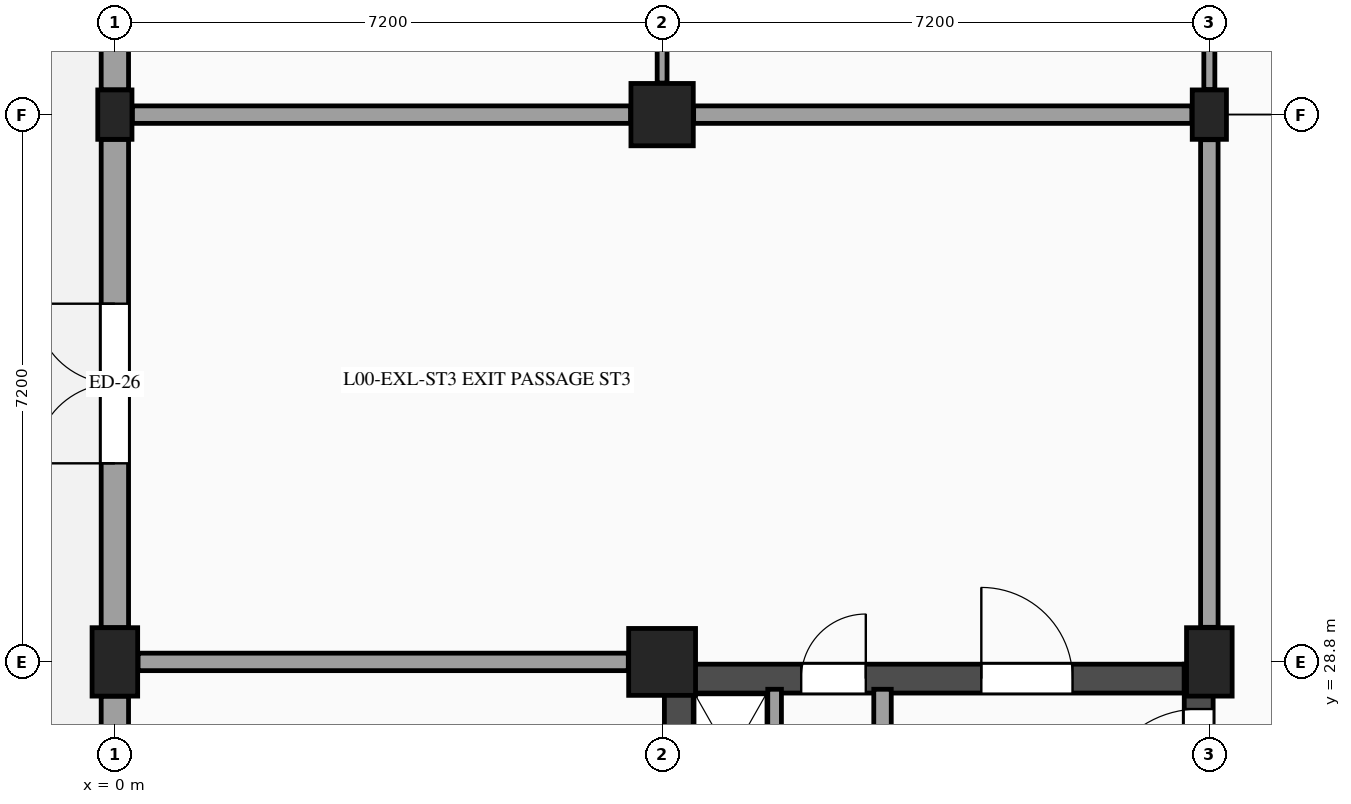
"""IFC4 building model, lengths in metres.
Left out: names, types, materials, properties, quantities, classifications, styles, units other than length and angle.
Written with IfcOpenShell. Run it as: python <this file> out.ifc"""

import sys

from ifc_helpers import new_model, si_unit, direction, frame, frame_2d, origin, origin_2d, place, context, subcontext, project, spatial, rectangle, extrude, element, fill, save


model = new_model("IFC4")
c1 = context("Model", 3, precision=1e-05, world=origin(), true_north=direction((0.0, 1.0)))
c2 = subcontext(c1, "Body", "Model", "MODEL_VIEW")
j1 = project(units=[si_unit("LENGTHUNIT", "METRE"), si_unit("PLANEANGLEUNIT", "RADIAN")], contexts=[c1])
p1 = place(None, origin())
s1 = spatial("IfcSite", under=j1, at=p1, CompositionType="ELEMENT")
p2 = place(p1, origin())
s2 = spatial("IfcBuilding", under=s1, at=p2, CompositionType="ELEMENT")
p3 = place(p2, origin())
s3 = spatial("IfcBuildingStorey", under=s2, at=p3, CompositionType="ELEMENT", Elevation=0.0)
p4 = place(p3, frame((0.0, 28.8, 0.0), z_axis=(0.0, 0.0, 1.0), x_axis=(1.0, 0.0, 0.0)))
e1 = element("IfcColumn", 1, at=p4, inside=s3, PredefinedType="COLUMN", context=c2, shape_type="SweptSolid", body=[
    extrude(rectangle(XDim=0.6, YDim=0.9, at=origin_2d()), origin(), (0.0, 0.0, 1.0), 5.4),
])
p5 = place(p3, frame((0.0, 36.0, 0.0), z_axis=(0.0, 0.0, 1.0), x_axis=(1.0, 0.0, 0.0)))
e2 = element("IfcColumn", 2, at=p5, inside=s3, PredefinedType="PILASTER", context=c2, shape_type="SweptSolid", body=[
    extrude(rectangle(XDim=0.45, YDim=0.65, at=origin_2d()), origin(), (0.0, 0.0, 1.0), 5.4),
])
p6 = place(p3, frame((7.2, 28.8, 0.0), z_axis=(0.0, 0.0, 1.0), x_axis=(1.0, 0.0, 0.0)))
e3 = element("IfcColumn", 3, at=p6, inside=s3, PredefinedType="COLUMN", context=c2, shape_type="SweptSolid", body=[
    extrude(rectangle(XDim=0.88, YDim=0.88, at=origin_2d()), origin(), (0.0, 0.0, 1.0), 5.4),
])
p7 = place(p3, frame((7.2, 36.0, 0.0), z_axis=(0.0, 0.0, 1.0), x_axis=(1.0, 0.0, 0.0)))
e4 = element("IfcColumn", 4, at=p7, inside=s3, PredefinedType="COLUMN", context=c2, shape_type="SweptSolid", body=[
    extrude(rectangle(XDim=0.82, YDim=0.82, at=origin_2d()), origin(), (0.0, 0.0, 1.0), 5.4),
])
p8 = place(p3, frame((14.4, 28.8, 0.0), z_axis=(0.0, 0.0, 1.0), x_axis=(1.0, 0.0, 0.0)))
e5 = element("IfcColumn", 5, at=p8, inside=s3, PredefinedType="COLUMN", context=c2, shape_type="SweptSolid", body=[
    extrude(rectangle(XDim=0.6, YDim=0.9, at=origin_2d()), origin(), (0.0, 0.0, 1.0), 5.4),
])
p9 = place(p3, frame((14.4, 36.0, 0.0), z_axis=(0.0, 0.0, 1.0), x_axis=(1.0, 0.0, 0.0)))
e6 = element("IfcColumn", 6, at=p9, inside=s3, PredefinedType="PILASTER", context=c2, shape_type="SweptSolid", body=[
    extrude(rectangle(XDim=0.45, YDim=0.65, at=origin_2d()), origin(), (0.0, 0.0, 1.0), 5.4),
])
p10 = place(p3, frame((0.0, 22.0, 0.0), z_axis=(0.0, 0.0, 1.0), x_axis=(0.0, 1.0, 0.0)))
e7 = element("IfcWall", 7, at=p10, inside=s3, PredefinedType="STANDARD", context=c2, shape_type="SweptSolid", body=[
    extrude(rectangle(XDim=6.35, YDim=0.36, at=frame_2d((3.175, 0.0))), origin(), (0.0, 0.0, 1.0), 4.335),
])
p11 = place(p10, frame((2.125, 0.0, 0.0)))
e8 = element("IfcOpeningElement", 8, at=p11, cuts=e7, PredefinedType="OPENING", context=c2, shape_type="SweptSolid", body=[
    extrude(rectangle(XDim=2.1, YDim=2.4, at=frame_2d((1.05, 1.2))), frame((0.0, 0.19, 0.0), z_axis=(0.0, -1.0, 0.0), x_axis=(1.0, 0.0, 0.0)), (0.0, 0.0, 1.0), 0.38),
])
p12 = place(p3, frame((0.0, 29.25, 0.0), z_axis=(0.0, 0.0, 1.0), x_axis=(0.0, 1.0, 0.0)))
e9 = element("IfcWall", 9, at=p12, inside=s3, PredefinedType="STANDARD", context=c2, shape_type="SweptSolid", body=[
    extrude(rectangle(XDim=6.425, YDim=0.36, at=frame_2d((3.212, 0.0))), origin(), (0.0, 0.0, 1.0), 4.335),
])
p13 = place(p12, frame((2.163, 0.0, 0.0)))
e10 = element("IfcOpeningElement", 10, at=p13, cuts=e9, PredefinedType="OPENING", context=c2, shape_type="SweptSolid", body=[
    extrude(rectangle(XDim=2.1, YDim=2.4, at=frame_2d((1.05, 1.2))), frame((0.0, 0.19, 0.0), z_axis=(0.0, -1.0, 0.0), x_axis=(1.0, 0.0, 0.0)), (0.0, 0.0, 1.0), 0.38),
])
p14 = place(p3, frame((0.0, 36.325, 0.0), z_axis=(0.0, 0.0, 1.0), x_axis=(0.0, 1.0, 0.0)))
e11 = element("IfcWall", 11, at=p14, inside=s3, PredefinedType="STANDARD", context=c2, shape_type="SweptSolid", body=[
    extrude(rectangle(XDim=6.425, YDim=0.36, at=frame_2d((3.212, 0.0))), origin(), (0.0, 0.0, 1.0), 4.335),
])
p15 = place(p14, frame((2.163, 0.0, 0.0)))
e12 = element("IfcOpeningElement", 12, at=p15, cuts=e11, PredefinedType="OPENING", context=c2, shape_type="SweptSolid", body=[
    extrude(rectangle(XDim=2.1, YDim=2.4, at=frame_2d((1.05, 1.2))), frame((0.0, 0.19, 0.0), z_axis=(0.0, -1.0, 0.0), x_axis=(1.0, 0.0, 0.0)), (0.0, 0.0, 1.0), 0.38),
])
p16 = place(p3, frame((7.42, 28.77, 0.0), z_axis=(0.0, 0.0, 1.0), x_axis=(0.0, -1.0, 0.0)))
e13 = element("IfcWall", 13, at=p16, inside=s3, PredefinedType="SHEAR", context=c2, shape_type="SweptSolid", body=[
    extrude(rectangle(XDim=7.14, YDim=0.38, at=frame_2d((3.57, 0.0))), origin(), (0.0, 0.0, 1.0), 5.09),
])
p17 = place(p3, frame((7.61, 28.58, 0.0), z_axis=(0.0, 0.0, 1.0), x_axis=(1.0, 0.0, 0.0)))
e14 = element("IfcWall", 14, at=p17, inside=s3, PredefinedType="SHEAR", context=c2, shape_type="SweptSolid", body=[
    extrude(rectangle(XDim=6.46, YDim=0.38, at=frame_2d((3.23, 0.0))), origin(), (0.0, 0.0, 1.0), 5.09),
])
p18 = place(p17, frame((1.42, 0.0, 0.0)))
e15 = element("IfcOpeningElement", 15, at=p18, cuts=e14, PredefinedType="OPENING", context=c2, shape_type="SweptSolid", body=[
    extrude(rectangle(XDim=0.85, YDim=2.1, at=frame_2d((0.425, 1.05))), frame((0.0, 0.2, 0.0), z_axis=(0.0, -1.0, 0.0), x_axis=(1.0, 0.0, 0.0)), (0.0, 0.0, 1.0), 0.4),
])
p19 = place(p17, frame((3.79, 0.0, 0.0)))
e16 = element("IfcOpeningElement", 16, at=p19, cuts=e14, PredefinedType="OPENING", context=c2, shape_type="SweptSolid", body=[
    extrude(rectangle(XDim=1.2, YDim=2.2, at=frame_2d((0.6, 1.1))), frame((0.0, 0.2, 0.0), z_axis=(0.0, -1.0, 0.0), x_axis=(1.0, 0.0, 0.0)), (0.0, 0.0, 1.0), 0.4),
])
p20 = place(p3, frame((10.1, 26.7, 0.0), z_axis=(0.0, 0.0, 1.0), x_axis=(0.0, 1.0, 0.0)))
e17 = element("IfcWall", 17, at=p20, inside=s3, PredefinedType="PARTITIONING", context=c2, shape_type="SweptSolid", body=[
    extrude(rectangle(XDim=1.74, YDim=0.23, at=frame_2d((0.87, 0.0))), origin(), (0.0, 0.0, 1.0), 5.09),
])
p21 = place(p3, frame((8.68, 26.68, 0.0), z_axis=(0.0, 0.0, 1.0), x_axis=(0.0, 1.0, 0.0)))
e18 = element("IfcWall", 18, at=p21, inside=s3, PredefinedType="PARTITIONING", context=c2, shape_type="SweptSolid", body=[
    extrude(rectangle(XDim=1.76, YDim=0.18, at=frame_2d((0.88, 0.0))), origin(), (0.0, 0.0, 1.0), 5.09),
])
p22 = place(p3, frame((14.26, 21.63, 0.0), z_axis=(0.0, 0.0, 1.0), x_axis=(0.0, 1.0, 0.0)))
e19 = element("IfcWall", 19, at=p22, inside=s3, PredefinedType="SHEAR", context=c2, shape_type="SweptSolid", body=[
    extrude(rectangle(XDim=7.14, YDim=0.38, at=frame_2d((3.57, 0.0))), origin(), (0.0, 0.0, 1.0), 5.09),
])
p23 = place(p22, frame((5.2, 0.0, 0.0)))
e20 = element("IfcOpeningElement", 20, at=p23, cuts=e19, PredefinedType="OPENING", context=c2, shape_type="SweptSolid", body=[
    extrude(rectangle(XDim=1.35, YDim=2.15, at=frame_2d((0.675, 1.075))), frame((0.0, 0.2, 0.0), z_axis=(0.0, -1.0, 0.0), x_axis=(1.0, 0.0, 0.0)), (0.0, 0.0, 1.0), 0.4),
])
p24 = place(p3, frame((0.305, 28.8, 0.0), z_axis=(0.0, 0.0, 1.0), x_axis=(1.0, 0.0, 0.0)))
e21 = element("IfcWall", 21, at=p24, inside=s3, PredefinedType="PARTITIONING", context=c2, shape_type="SweptSolid", body=[
    extrude(rectangle(XDim=6.45, YDim=0.23, at=frame_2d((3.225, 0.0))), origin(), (0.0, 0.0, 1.0), 4.31),
])
p25 = place(p3, frame((0.23, 36.0, 0.0), z_axis=(0.0, 0.0, 1.0), x_axis=(1.0, 0.0, 0.0)))
e22 = element("IfcWall", 22, at=p25, inside=s3, PredefinedType="PARTITIONING", context=c2, shape_type="SweptSolid", body=[
    extrude(rectangle(XDim=6.555, YDim=0.23, at=frame_2d((3.277, 0.0))), origin(), (0.0, 0.0, 1.0), 4.31),
])
p26 = place(p3, frame((7.2, 36.415, 0.0), z_axis=(0.0, 0.0, 1.0), x_axis=(0.0, 1.0, 0.0)))
e23 = element("IfcWall", 23, at=p26, inside=s3, PredefinedType="PARTITIONING", context=c2, shape_type="SweptSolid", body=[
    extrude(rectangle(XDim=6.38, YDim=0.13, at=frame_2d((3.19, 0.0))), origin(), (0.0, 0.0, 1.0), 4.395),
])
p27 = place(p26, frame((2.5, 0.0, 0.0)))
e24 = element("IfcOpeningElement", 24, at=p27, cuts=e23, PredefinedType="OPENING", context=c2, shape_type="SweptSolid", body=[
    extrude(rectangle(XDim=1.38, YDim=2.22, at=frame_2d((0.69, 1.11))), frame((0.0, 0.075, 0.0), z_axis=(0.0, -1.0, 0.0), x_axis=(1.0, 0.0, 0.0)), (0.0, 0.0, 1.0), 0.15),
])
p28 = place(p3, frame((14.4, 29.255, 0.0), z_axis=(0.0, 0.0, 1.0), x_axis=(0.0, 1.0, 0.0)))
e25 = element("IfcWall", 25, at=p28, inside=s3, PredefinedType="PARTITIONING", context=c2, shape_type="SweptSolid", body=[
    extrude(rectangle(XDim=6.415, YDim=0.23, at=frame_2d((3.208, 0.0))), origin(), (0.0, 0.0, 1.0), 4.395),
])
p29 = place(p3, frame((7.615, 36.0, 0.0), z_axis=(0.0, 0.0, 1.0), x_axis=(1.0, 0.0, 0.0)))
e26 = element("IfcWall", 26, at=p29, inside=s3, PredefinedType="PARTITIONING", context=c2, shape_type="SweptSolid", body=[
    extrude(rectangle(XDim=6.555, YDim=0.23, at=frame_2d((3.277, 0.0))), origin(), (0.0, 0.0, 1.0), 4.34),
])
p30 = place(p3, frame((14.4, 36.33, 0.0), z_axis=(0.0, 0.0, 1.0), x_axis=(0.0, 1.0, 0.0)))
e27 = element("IfcWall", 27, at=p30, inside=s3, PredefinedType="PARTITIONING", context=c2, shape_type="SweptSolid", body=[
    extrude(rectangle(XDim=6.415, YDim=0.145, at=frame_2d((3.208, 0.0))), origin(), (0.0, 0.0, 1.0), 4.395),
])
p31 = place(p30, frame((2.248, 0.0, 0.0)))
e28 = element("IfcOpeningElement", 28, at=p31, cuts=e27, PredefinedType="OPENING", context=c2, shape_type="SweptSolid", body=[
    extrude(rectangle(XDim=1.92, YDim=2.35, at=frame_2d((0.96, 1.175))), frame((0.0, 0.083, 0.0), z_axis=(0.0, -1.0, 0.0), x_axis=(1.0, 0.0, 0.0)), (0.0, 0.0, 1.0), 0.165),
])
p32 = place(p13, origin())
e29 = element("IfcDoor", 29, at=p32, inside=s3, OperationType="DOUBLE_DOOR_SINGLE_SWING", PredefinedType="DOOR", context=c2, shape_type="SweptSolid", body=[
    extrude(rectangle(XDim=2.1, YDim=2.4, at=frame_2d((1.05, 1.2))), frame((0.0, 0.025, 0.0), z_axis=(0.0, -1.0, 0.0), x_axis=(1.0, 0.0, 0.0)), (0.0, 0.0, 1.0), 0.05),
])
fill(e10, e29)
p33 = place(p18, origin())
e30 = element("IfcDoor", 30, at=p33, inside=s3, OperationType="SINGLE_SWING_RIGHT", PredefinedType="DOOR", context=c2, shape_type="SweptSolid", body=[
    extrude(rectangle(XDim=0.85, YDim=2.1, at=frame_2d((0.425, 1.05))), frame((0.0, 0.025, 0.0), z_axis=(0.0, -1.0, 0.0), x_axis=(1.0, 0.0, 0.0)), (0.0, 0.0, 1.0), 0.05),
])
fill(e15, e30)
p34 = place(p19, origin())
e31 = element("IfcDoor", 31, at=p34, inside=s3, OperationType="SINGLE_SWING_LEFT", PredefinedType="DOOR", context=c2, shape_type="SweptSolid", body=[
    extrude(rectangle(XDim=1.2, YDim=2.2, at=frame_2d((0.6, 1.1))), frame((0.0, 0.025, 0.0), z_axis=(0.0, -1.0, 0.0), x_axis=(1.0, 0.0, 0.0)), (0.0, 0.0, 1.0), 0.05),
])
fill(e16, e31)
p35 = place(p23, frame((1.35, 0.0, 0.0), z_axis=(0.0, 0.0, 1.0), x_axis=(-1.0, 0.0, 0.0)))
e32 = element("IfcDoor", 32, at=p35, inside=s3, OperationType="SINGLE_SWING_LEFT", PredefinedType="DOOR", context=c2, shape_type="SweptSolid", body=[
    extrude(rectangle(XDim=1.35, YDim=2.15, at=frame_2d((0.675, 1.075))), frame((0.0, 0.025, 0.0), z_axis=(0.0, -1.0, 0.0), x_axis=(1.0, 0.0, 0.0)), (0.0, 0.0, 1.0), 0.05),
])
fill(e20, e32)
save(model, sys.argv[1])
